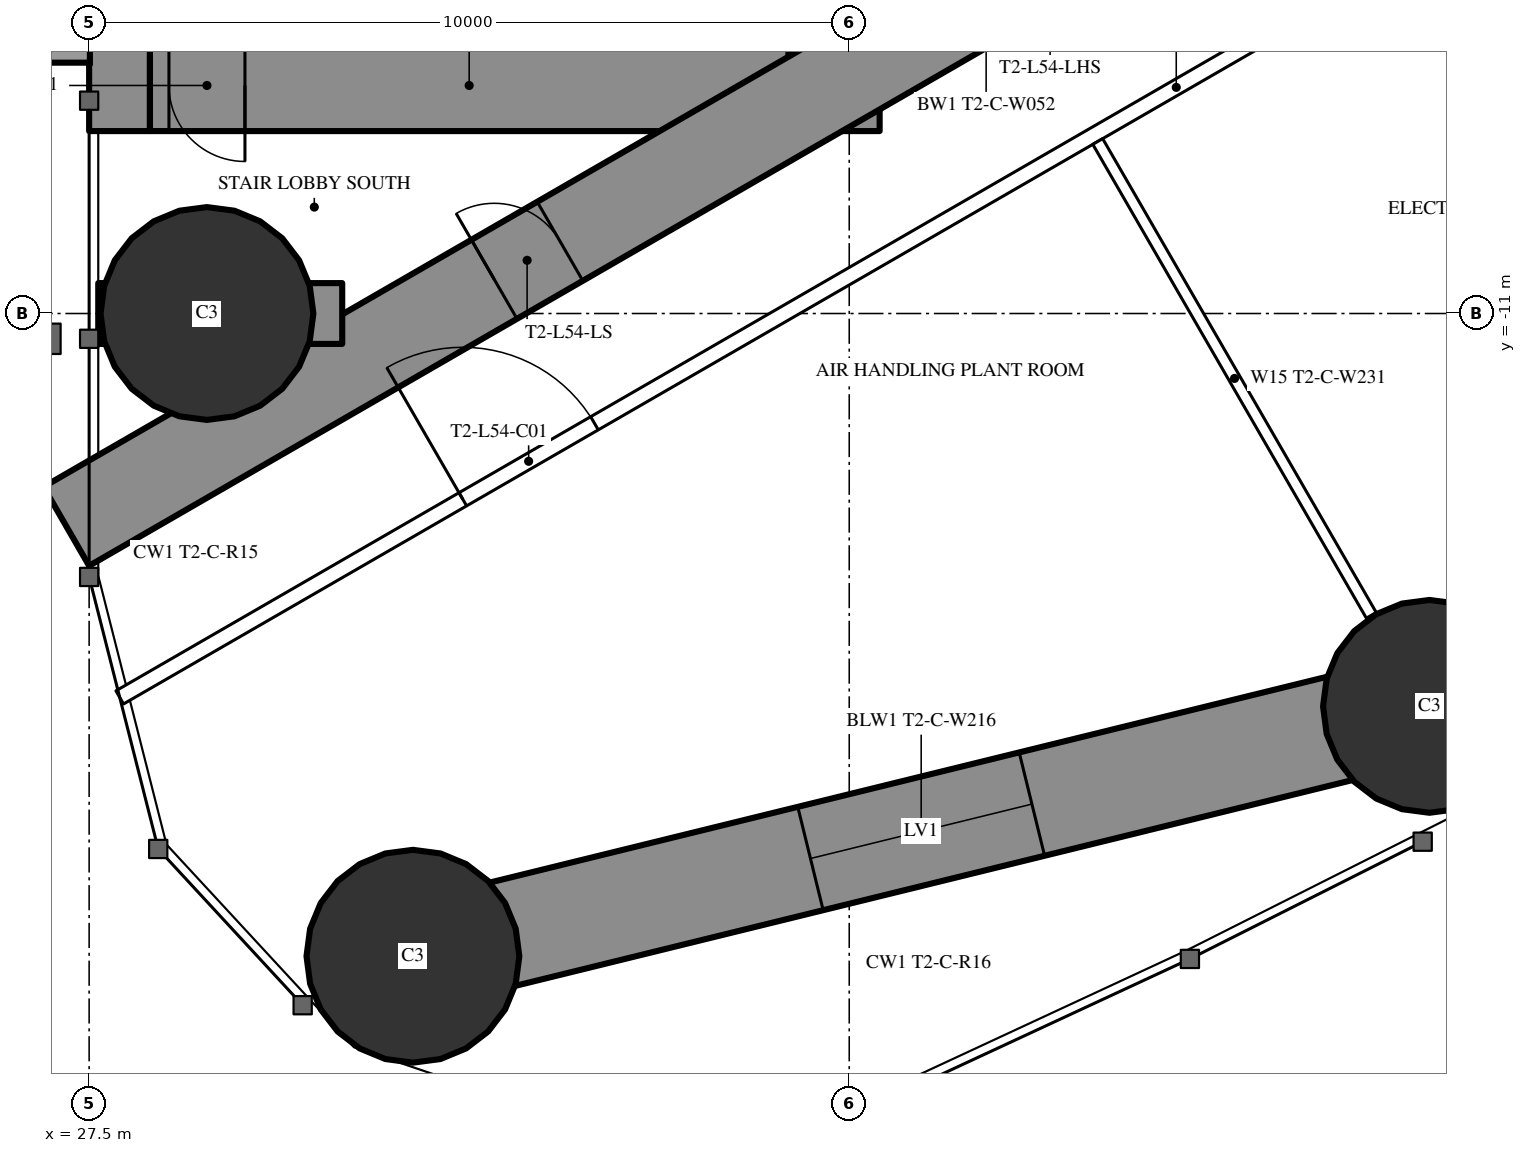
"""IFC4 building model, lengths in metres.
Left out: names, types, materials, properties, quantities, classifications, styles, units other than length and angle.
Written with IfcOpenShell. Run it as: python <this file> out.ifc"""

import sys

from ifc_helpers import new_model, si_unit, direction, frame, frame_2d, origin, origin_2d, place, context, subcontext, project, spatial, rectangle, circle, extrude, element, fill, save


model = new_model("IFC4")
c1 = context("Model", 3, precision=1e-05, world=origin(), true_north=direction((0.0, 1.0)))
c2 = subcontext(c1, "Body", "Model", "MODEL_VIEW")
j1 = project(units=[si_unit("LENGTHUNIT", "METRE"), si_unit("PLANEANGLEUNIT", "RADIAN")], contexts=[c1])
p1 = place(None, origin())
s1 = spatial("IfcSite", under=j1, at=p1, CompositionType="ELEMENT")
p2 = place(p1, origin())
s2 = spatial("IfcBuilding", under=s1, at=p2, CompositionType="ELEMENT")
p3 = place(p2, frame((0.0, 0.0, 201.8)))
s3 = spatial("IfcBuildingStorey", under=s2, at=p3, CompositionType="ELEMENT", Elevation=201.8)
for number, where, z_axis, x_axis in (
    (1, (31.76, -19.456, 0.0), (0.0, 0.0, 1.0), (1.0, 0.0, 0.0)),
    (2, (29.05, -11.0, 0.0), (0.0, 0.0, 1.0), (1.0, 0.0, 0.0)),
    (3, (45.134, -16.168, 0.0), (0.0, 0.0, 1.0), (1.0, 0.0, 0.0)),
):
    element("IfcColumn", number, at=place(p3, frame(where, z_axis=z_axis, x_axis=x_axis)), inside=s3, PredefinedType="COLUMN", context=c2, shape_type="SweptSolid", body=[
        extrude(circle(Radius=1.4, at=origin_2d()), origin(), (0.0, 0.0, 1.0), 3.5),
    ])
p4 = place(p3, frame((27.9, -8.6, 0.0), z_axis=(0.0, 0.0, 1.0), x_axis=(0.0, 1.0, 0.0)))
e4 = element("IfcWall", 4, at=p4, inside=s3, PredefinedType="SHEAR", context=c2, shape_type="SweptSolid", body=[
    extrude(rectangle(XDim=17.2, YDim=0.8, at=frame_2d((8.6, 0.0))), origin(), (0.0, 0.0, 1.0), 3.5),
])
p5 = place(p4, frame((2.45, 0.0, 0.6)))
e5 = element("IfcOpeningElement", 5, at=p5, cuts=e4, PredefinedType="OPENING", context=c2, shape_type="SweptSolid", body=[
    extrude(rectangle(XDim=0.6, YDim=2.1, at=frame_2d((0.3, 1.05))), frame((0.0, 0.41, 0.0), z_axis=(0.0, -1.0, 0.0), x_axis=(1.0, 0.0, 0.0)), (0.0, 0.0, 1.0), 0.82),
])
p6 = place(p4, frame((14.15, 0.0, 0.6)))
e6 = element("IfcOpeningElement", 6, at=p6, cuts=e4, PredefinedType="OPENING", context=c2, shape_type="SweptSolid", body=[
    extrude(rectangle(XDim=0.6, YDim=2.1, at=frame_2d((0.3, 1.05))), frame((0.0, 0.41, 0.0), z_axis=(0.0, -1.0, 0.0), x_axis=(1.0, 0.0, 0.0)), (0.0, 0.0, 1.0), 0.82),
])
p7 = place(p3, frame((37.3, -8.6, 0.0), z_axis=(0.0, 0.0, 1.0), x_axis=(0.0, 1.0, 0.0)))
e7 = element("IfcWall", 7, at=p7, inside=s3, PredefinedType="SHEAR", context=c2, shape_type="SweptSolid", body=[
    extrude(rectangle(XDim=17.2, YDim=1.2, at=frame_2d((8.6, 0.0))), origin(), (0.0, 0.0, 1.0), 3.5),
])
p8 = place(p7, frame((7.7, 0.0, 0.0)))
e8 = element("IfcOpeningElement", 8, at=p8, cuts=e7, PredefinedType="OPENING", context=c2, shape_type="SweptSolid", body=[
    extrude(rectangle(XDim=1.8, YDim=2.2, at=frame_2d((0.9, 1.1))), frame((0.0, 0.61, 0.0), z_axis=(0.0, -1.0, 0.0), x_axis=(1.0, 0.0, 0.0)), (0.0, 0.0, 1.0), 1.22),
])
p9 = place(p3, frame((28.3, -8.0, 0.0), z_axis=(0.0, 0.0, 1.0), x_axis=(1.0, 0.0, 0.0)))
e9 = element("IfcWall", 9, at=p9, inside=s3, PredefinedType="SHEAR", context=c2, shape_type="SweptSolid", body=[
    extrude(rectangle(XDim=8.4, YDim=1.2, at=frame_2d((4.2, 0.0))), origin(), (0.0, 0.0, 1.0), 3.5),
])
p10 = place(p9, frame((0.25, 0.0, 0.0)))
e10 = element("IfcOpeningElement", 10, at=p10, cuts=e9, PredefinedType="OPENING", context=c2, shape_type="SweptSolid", body=[
    extrude(rectangle(XDim=1.0, YDim=2.2, at=frame_2d((0.5, 1.1))), frame((0.0, 0.61, 0.0), z_axis=(0.0, -1.0, 0.0), x_axis=(1.0, 0.0, 0.0)), (0.0, 0.0, 1.0), 1.22),
])
p11 = place(p3, frame((27.2, -13.8, 0.0), z_axis=(0.0, 0.0, 1.0), x_axis=(0.866027159892, 0.499996958321, 0.0)))
e11 = element("IfcWall", 11, at=p11, inside=s3, PredefinedType="SHEAR", context=c2, shape_type="SweptSolid", body=[
    extrude(rectangle(XDim=27.947, YDim=1.2, at=frame_2d((13.973, 0.0))), origin(), (0.0, 0.0, 1.0), 3.5),
])
p12 = place(p11, frame((6.5, 0.0, 0.0)))
e12 = element("IfcOpeningElement", 12, at=p12, cuts=e11, PredefinedType="OPENING", context=c2, shape_type="SweptSolid", body=[
    extrude(rectangle(XDim=1.0, YDim=2.2, at=frame_2d((0.5, 1.1))), frame((0.0, 0.61, 0.0), z_axis=(0.0, -1.0, 0.0), x_axis=(1.0, 0.0, 0.0)), (0.0, 0.0, 1.0), 1.22),
])
p13 = place(p11, frame((14.045, 0.0, 0.0)))
e13 = element("IfcOpeningElement", 13, at=p13, cuts=e11, PredefinedType="OPENING", context=c2, shape_type="SweptSolid", body=[
    extrude(rectangle(XDim=1.8, YDim=2.2, at=frame_2d((0.9, 1.1))), frame((0.0, 0.61, 0.0), z_axis=(0.0, -1.0, 0.0), x_axis=(1.0, 0.0, 0.0)), (0.0, 0.0, 1.0), 1.22),
])
p14 = place(p3, frame((27.62, -11.0, 0.0), z_axis=(0.0, 0.0, 1.0), x_axis=(1.0, 0.0, 0.0)))
e14 = element("IfcWall", 14, at=p14, inside=s3, PredefinedType="SHEAR", context=c2, shape_type="SweptSolid", body=[
    extrude(rectangle(XDim=3.209, YDim=0.8, at=frame_2d((1.605, 0.0))), origin(), (0.0, 0.0, 1.0), 3.5),
])
p15 = place(p3, frame((31.76, -19.456, 0.0), z_axis=(0.0, 0.0, 1.0), x_axis=(0.971093253227, 0.238700426344, 0.0)))
e15 = element("IfcWall", 15, at=p15, inside=s3, PredefinedType="SHEAR", context=c2, shape_type="SweptSolid", body=[
    extrude(rectangle(XDim=13.772, YDim=1.4, at=frame_2d((6.886, 0.0))), origin(), (0.0, 0.0, 1.0), 3.5),
])
p16 = place(p15, frame((5.386, 0.0, 0.6)))
e16 = element("IfcOpeningElement", 16, at=p16, cuts=e15, PredefinedType="OPENING", context=c2, shape_type="SweptSolid", body=[
    extrude(rectangle(XDim=3.0, YDim=1.2, at=frame_2d((1.5, 0.6))), frame((0.0, 0.71, 0.0), z_axis=(0.0, -1.0, 0.0), x_axis=(1.0, 0.0, 0.0)), (0.0, 0.0, 1.0), 1.42),
])
p17 = place(p3, frame((45.134, -16.168, 0.0), z_axis=(0.0, 0.0, 1.0), x_axis=(0.870721990329, 0.491775574381, 0.0)))
e17 = element("IfcWall", 17, at=p17, inside=s3, PredefinedType="SHEAR", context=c2, shape_type="SweptSolid", body=[
    extrude(rectangle(XDim=8.569, YDim=1.4, at=frame_2d((4.284, 0.0))), origin(), (0.0, 0.0, 1.0), 3.5),
])
p18 = place(p17, frame((2.784, 0.0, 0.6)))
e18 = element("IfcOpeningElement", 18, at=p18, cuts=e17, PredefinedType="OPENING", context=c2, shape_type="SweptSolid", body=[
    extrude(rectangle(XDim=3.0, YDim=1.2, at=frame_2d((1.5, 0.6))), frame((0.0, 0.71, 0.0), z_axis=(0.0, -1.0, 0.0), x_axis=(1.0, 0.0, 0.0)), (0.0, 0.0, 1.0), 1.42),
])
p19 = place(p3, frame((27.903, -16.05, 0.0), z_axis=(0.0, 0.0, 1.0), x_axis=(0.866022581743, 0.500004887887, 0.0)))
e19 = element("IfcWall", 19, at=p19, inside=s3, PredefinedType="PARTITIONING", context=c2, shape_type="SweptSolid", body=[
    extrude(rectangle(XDim=32.1, YDim=0.2, at=frame_2d((16.05, 0.0))), origin(), (0.0, 0.0, 1.0), 3.25),
])
p20 = place(p19, frame((5.212, 0.0, 0.0)))
e20 = element("IfcOpeningElement", 20, at=p20, cuts=e19, PredefinedType="OPENING", context=c2, shape_type="SweptSolid", body=[
    extrude(rectangle(XDim=2.0, YDim=2.4, at=frame_2d((1.0, 1.2))), frame((0.0, 0.11, 0.0), z_axis=(0.0, -1.0, 0.0), x_axis=(1.0, 0.0, 0.0)), (0.0, 0.0, 1.0), 0.22),
])
p21 = place(p19, frame((18.133, 0.0, 0.0)))
e21 = element("IfcOpeningElement", 21, at=p21, cuts=e19, PredefinedType="OPENING", context=c2, shape_type="SweptSolid", body=[
    extrude(rectangle(XDim=2.0, YDim=2.4, at=frame_2d((1.0, 1.2))), frame((0.0, 0.11, 0.0), z_axis=(0.0, -1.0, 0.0), x_axis=(1.0, 0.0, 0.0)), (0.0, 0.0, 1.0), 0.22),
])
p22 = place(p19, frame((24.717, 0.0, 0.0)))
e22 = element("IfcOpeningElement", 22, at=p22, cuts=e19, PredefinedType="OPENING", context=c2, shape_type="SweptSolid", body=[
    extrude(rectangle(XDim=2.0, YDim=2.4, at=frame_2d((1.0, 1.2))), frame((0.0, 0.11, 0.0), z_axis=(0.0, -1.0, 0.0), x_axis=(1.0, 0.0, 0.0)), (0.0, 0.0, 1.0), 0.22),
])
p23 = place(p19, frame((28.836, 0.0, 0.0)))
e23 = element("IfcOpeningElement", 23, at=p23, cuts=e19, PredefinedType="OPENING", context=c2, shape_type="SweptSolid", body=[
    extrude(rectangle(XDim=2.0, YDim=2.4, at=frame_2d((1.0, 1.2))), frame((0.0, 0.11, 0.0), z_axis=(0.0, -1.0, 0.0), x_axis=(1.0, 0.0, 0.0)), (0.0, 0.0, 1.0), 0.22),
])
p24 = place(p3, frame((40.769, -8.737, 0.0), z_axis=(0.0, 0.0, 1.0), x_axis=(0.500013115284, -0.866017831539, 0.0)))
e24 = element("IfcWall", 24, at=p24, inside=s3, PredefinedType="PARTITIONING", context=c2, shape_type="SweptSolid", body=[
    extrude(rectangle(XDim=7.198, YDim=0.15, at=frame_2d((3.599, 0.0))), origin(), (0.0, 0.0, 1.0), 2.05),
])
p25 = place(p16, origin())
e25 = element("IfcWindow", 25, at=p25, inside=s3, PartitioningType="SINGLE_PANEL", PredefinedType="WINDOW", context=c2, shape_type="SweptSolid", body=[
    extrude(rectangle(XDim=3.0, YDim=1.2, at=frame_2d((1.5, 0.6))), frame((0.0, 0.03, 0.0), z_axis=(0.0, -1.0, 0.0), x_axis=(1.0, 0.0, 0.0)), (0.0, 0.0, 1.0), 0.06),
])
fill(e16, e25)
p26 = place(p20, origin())
e26 = element("IfcDoor", 26, at=p26, inside=s3, OperationType="DOUBLE_DOOR_SINGLE_SWING", PredefinedType="DOOR", context=c2, shape_type="SweptSolid", body=[
    extrude(rectangle(XDim=2.0, YDim=2.4, at=frame_2d((1.0, 1.2))), frame((0.0, 0.025, 0.0), z_axis=(0.0, -1.0, 0.0), x_axis=(1.0, 0.0, 0.0)), (0.0, 0.0, 1.0), 0.05),
])
fill(e20, e26)
p27 = place(p12, origin())
e27 = element("IfcDoor", 27, at=p27, inside=s3, OperationType="SINGLE_SWING_LEFT", PredefinedType="DOOR", context=c2, shape_type="SweptSolid", body=[
    extrude(rectangle(XDim=1.0, YDim=2.2, at=frame_2d((0.5, 1.1))), frame((0.0, 0.025, 0.0), z_axis=(0.0, -1.0, 0.0), x_axis=(1.0, 0.0, 0.0)), (0.0, 0.0, 1.0), 0.05),
])
fill(e12, e27)
p28 = place(p10, origin())
e28 = element("IfcDoor", 28, at=p28, inside=s3, OperationType="SINGLE_SWING_RIGHT", PredefinedType="DOOR", context=c2, shape_type="SweptSolid", body=[
    extrude(rectangle(XDim=1.0, YDim=2.2, at=frame_2d((0.5, 1.1))), frame((0.0, 0.025, 0.0), z_axis=(0.0, -1.0, 0.0), x_axis=(1.0, 0.0, 0.0)), (0.0, 0.0, 1.0), 0.05),
])
fill(e10, e28)
save(model, sys.argv[1])
